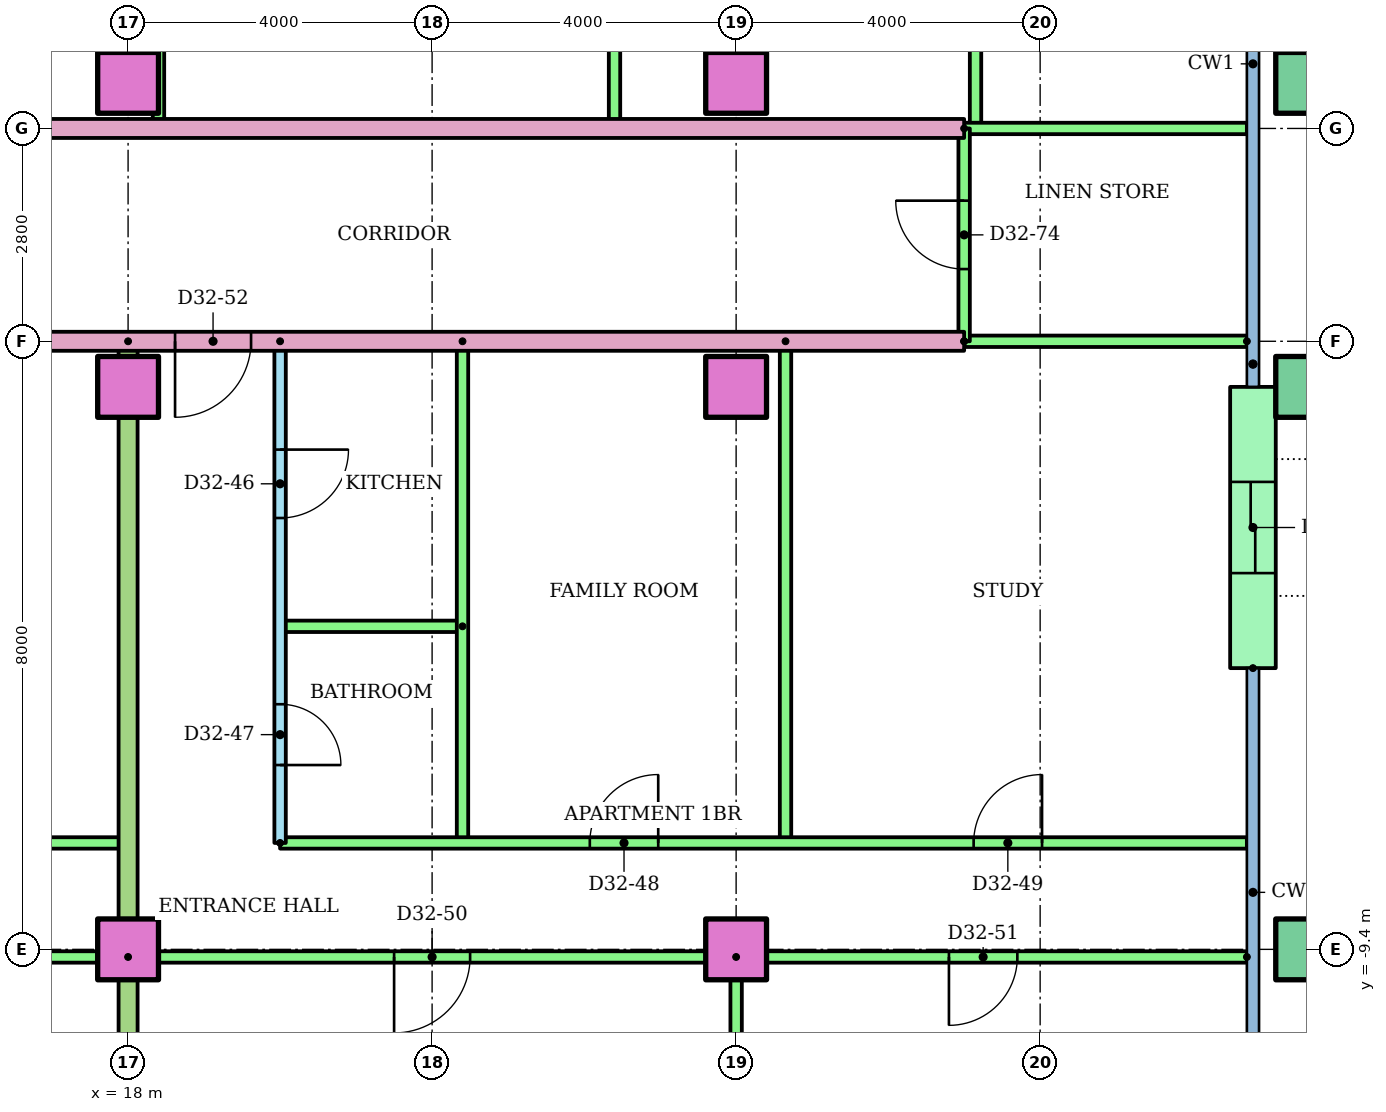
"""IFC4 building model, lengths in metres.
Left out: names, types, materials, properties, quantities, classifications, styles, units other than length and angle.
Written with IfcOpenShell. Run it as: python <this file> out.ifc"""

import sys

from ifc_helpers import new_model, si_unit, direction, frame, frame_2d, origin, origin_2d, place, context, subcontext, project, spatial, rectangle, hollow_rectangle, extrude, element, fill, save


model = new_model("IFC4")
c1 = context("Model", 3, precision=1e-05, world=origin(), true_north=direction((0.0, 1.0)))
c2 = subcontext(c1, "Body", "Model", "MODEL_VIEW")
j1 = project(units=[si_unit("LENGTHUNIT", "METRE"), si_unit("PLANEANGLEUNIT", "RADIAN")], contexts=[c1])
p1 = place(None, origin())
s1 = spatial("IfcSite", under=j1, at=p1, CompositionType="ELEMENT")
p2 = place(p1, origin())
s2 = spatial("IfcBuilding", under=s1, at=p2, CompositionType="ELEMENT")
p3 = place(p2, frame((0.0, 0.0, 126.2)))
s3 = spatial("IfcBuildingStorey", under=s2, at=p3, CompositionType="ELEMENT", Elevation=126.2)
for number, where in (
    (1, (18.0, -9.4, 0.0)),
    (2, (26.0, -9.4, 0.0)),
):
    element("IfcColumn", number, at=place(p3, frame(where)), inside=s3, PredefinedType="COLUMN", context=c2, shape_type="SweptSolid", body=[
        extrude(rectangle(XDim=0.8, YDim=0.8, at=origin_2d()), origin(), (0.0, 0.0, 1.0), 3.2),
    ])
p4 = place(p3, frame((33.5, -9.4, 0.0)))
e3 = element("IfcColumn", 3, at=p4, inside=s3, PredefinedType="COLUMN", context=c2, shape_type="SweptSolid", body=[
    extrude(hollow_rectangle(XDim=0.8, YDim=0.8, WallThickness=0.04, at=origin_2d()), origin(), (0.0, 0.0, 1.0), 3.2),
])
for number, where in (
    (4, (18.0, -2.0, 0.0)),
    (5, (26.0, -2.0, 0.0)),
):
    element("IfcColumn", number, at=place(p3, frame(where)), inside=s3, PredefinedType="COLUMN", context=c2, shape_type="SweptSolid", body=[
        extrude(rectangle(XDim=0.8, YDim=0.8, at=origin_2d()), origin(), (0.0, 0.0, 1.0), 3.2),
    ])
p5 = place(p3, frame((33.5, -2.0, 0.0)))
e6 = element("IfcColumn", 6, at=p5, inside=s3, PredefinedType="COLUMN", context=c2, shape_type="SweptSolid", body=[
    extrude(hollow_rectangle(XDim=0.8, YDim=0.8, WallThickness=0.04, at=origin_2d()), origin(), (0.0, 0.0, 1.0), 3.2),
])
for number, where in (
    (7, (18.0, 2.0, 0.0)),
    (8, (26.0, 2.0, 0.0)),
):
    element("IfcColumn", number, at=place(p3, frame(where)), inside=s3, PredefinedType="COLUMN", context=c2, shape_type="SweptSolid", body=[
        extrude(rectangle(XDim=0.8, YDim=0.8, at=origin_2d()), origin(), (0.0, 0.0, 1.0), 3.2),
    ])
p6 = place(p3, frame((33.5, 2.0, 0.0)))
e9 = element("IfcColumn", 9, at=p6, inside=s3, PredefinedType="COLUMN", context=c2, shape_type="SweptSolid", body=[
    extrude(hollow_rectangle(XDim=0.8, YDim=0.8, WallThickness=0.04, at=origin_2d()), origin(), (0.0, 0.0, 1.0), 3.2),
])
p7 = place(p3, frame((32.8, -5.7, 0.0), z_axis=(0.0, 0.0, 1.0), x_axis=(0.0, 1.0, 0.0)))
e10 = element("IfcWall", 10, at=p7, inside=s3, PredefinedType="STANDARD", context=c2, shape_type="SweptSolid", body=[
    extrude(rectangle(XDim=3.7, YDim=0.6, at=frame_2d((1.85, 0.0))), origin(), (0.0, 0.0, 1.0), 2.92),
])
p8 = place(p7, frame((1.25, 0.0, 0.0)))
e11 = element("IfcOpeningElement", 11, at=p8, cuts=e10, PredefinedType="OPENING", context=c2, shape_type="SweptSolid", body=[
    extrude(rectangle(XDim=1.2, YDim=2.1, at=frame_2d((0.6, 1.05))), frame((0.0, 0.31, 0.0), z_axis=(0.0, -1.0, 0.0), x_axis=(1.0, 0.0, 0.0)), (0.0, 0.0, 1.0), 0.62),
])
p9 = place(p3, frame((4.0, -8.0, 0.0)))
e12 = element("IfcWall", 12, at=p9, inside=s3, PredefinedType="PARTITIONING", context=c2, shape_type="SweptSolid", body=[
    extrude(rectangle(XDim=14.0, YDim=0.15, at=frame_2d((7.0, 0.0))), origin(), (0.0, 0.0, 1.0), 2.4),
])
p10 = place(p9, frame((4.325, 0.0, 0.0)))
e13 = element("IfcOpeningElement", 13, at=p10, cuts=e12, PredefinedType="OPENING", context=c2, shape_type="SweptSolid", body=[
    extrude(rectangle(XDim=0.9, YDim=2.1, at=frame_2d((0.45, 1.05))), frame((0.0, 0.085, 0.0), z_axis=(0.0, -1.0, 0.0), x_axis=(1.0, 0.0, 0.0)), (0.0, 0.0, 1.0), 0.17),
])
p11 = place(p9, frame((8.575, 0.0, 0.0)))
e14 = element("IfcOpeningElement", 14, at=p11, cuts=e12, PredefinedType="OPENING", context=c2, shape_type="SweptSolid", body=[
    extrude(rectangle(XDim=0.9, YDim=2.1, at=frame_2d((0.45, 1.05))), frame((0.0, 0.085, 0.0), z_axis=(0.0, -1.0, 0.0), x_axis=(1.0, 0.0, 0.0)), (0.0, 0.0, 1.0), 0.17),
])
p12 = place(p9, frame((12.0, 0.0, 0.0)))
e15 = element("IfcOpeningElement", 15, at=p12, cuts=e12, PredefinedType="OPENING", context=c2, shape_type="SweptSolid", body=[
    extrude(rectangle(XDim=0.9, YDim=2.1, at=frame_2d((0.45, 1.05))), frame((0.0, 0.085, 0.0), z_axis=(0.0, -1.0, 0.0), x_axis=(1.0, 0.0, 0.0)), (0.0, 0.0, 1.0), 0.17),
])
p13 = place(p3, frame((18.0, -9.5, 0.0), z_axis=(0.0, 0.0, 1.0), x_axis=(-1.0, 0.0, 0.0)))
e16 = element("IfcWall", 16, at=p13, inside=s3, PredefinedType="PARTITIONING", context=c2, shape_type="SweptSolid", body=[
    extrude(rectangle(XDim=16.0, YDim=0.15, at=frame_2d((8.0, 0.0))), origin(), (0.0, 0.0, 1.0), 2.4),
])
p14 = place(p13, frame((13.55, 0.0, 0.0)))
e17 = element("IfcOpeningElement", 17, at=p14, cuts=e16, PredefinedType="OPENING", context=c2, shape_type="SweptSolid", body=[
    extrude(rectangle(XDim=0.9, YDim=2.1, at=frame_2d((0.45, 1.05))), frame((0.0, 0.085, 0.0), z_axis=(0.0, -1.0, 0.0), x_axis=(1.0, 0.0, 0.0)), (0.0, 0.0, 1.0), 0.17),
])
p15 = place(p13, frame((9.55, 0.0, 0.0)))
e18 = element("IfcOpeningElement", 18, at=p15, cuts=e16, PredefinedType="OPENING", context=c2, shape_type="SweptSolid", body=[
    extrude(rectangle(XDim=0.9, YDim=2.1, at=frame_2d((0.45, 1.05))), frame((0.0, 0.085, 0.0), z_axis=(0.0, -1.0, 0.0), x_axis=(1.0, 0.0, 0.0)), (0.0, 0.0, 1.0), 0.17),
])
p16 = place(p13, frame((5.55, 0.0, 0.0)))
e19 = element("IfcOpeningElement", 19, at=p16, cuts=e16, PredefinedType="OPENING", context=c2, shape_type="SweptSolid", body=[
    extrude(rectangle(XDim=0.9, YDim=2.1, at=frame_2d((0.45, 1.05))), frame((0.0, 0.085, 0.0), z_axis=(0.0, -1.0, 0.0), x_axis=(1.0, 0.0, 0.0)), (0.0, 0.0, 1.0), 0.17),
])
p17 = place(p13, frame((1.5, 0.0, 0.0)))
e20 = element("IfcOpeningElement", 20, at=p17, cuts=e16, PredefinedType="OPENING", context=c2, shape_type="SweptSolid", body=[
    extrude(rectangle(XDim=1.0, YDim=2.1, at=frame_2d((0.5, 1.05))), frame((0.0, 0.085, 0.0), z_axis=(0.0, -1.0, 0.0), x_axis=(1.0, 0.0, 0.0)), (0.0, 0.0, 1.0), 0.17),
])
p18 = place(p3, frame((20.0, -1.4, 0.0), z_axis=(0.0, 0.0, 1.0), x_axis=(0.0, -1.0, 0.0)))
e21 = element("IfcWall", 21, at=p18, inside=s3, PredefinedType="PARTITIONING", context=c2, shape_type="SweptSolid", body=[
    extrude(rectangle(XDim=6.6, YDim=0.15, at=frame_2d((3.3, 0.0))), origin(), (0.0, 0.0, 1.0), 2.4),
])
p19 = place(p18, frame((1.425, 0.0, 0.0)))
e22 = element("IfcOpeningElement", 22, at=p19, cuts=e21, PredefinedType="OPENING", context=c2, shape_type="SweptSolid", body=[
    extrude(rectangle(XDim=0.9, YDim=2.1, at=frame_2d((0.45, 1.05))), frame((0.0, 0.085, 0.0), z_axis=(0.0, -1.0, 0.0), x_axis=(1.0, 0.0, 0.0)), (0.0, 0.0, 1.0), 0.17),
])
p20 = place(p18, frame((4.775, 0.0, 0.0)))
e23 = element("IfcOpeningElement", 23, at=p20, cuts=e21, PredefinedType="OPENING", context=c2, shape_type="SweptSolid", body=[
    extrude(rectangle(XDim=0.8, YDim=2.1, at=frame_2d((0.4, 1.05))), frame((0.0, 0.085, 0.0), z_axis=(0.0, -1.0, 0.0), x_axis=(1.0, 0.0, 0.0)), (0.0, 0.0, 1.0), 0.17),
])
p21 = place(p3, frame((22.4, -5.15, 0.0), z_axis=(0.0, 0.0, 1.0), x_axis=(-1.0, 0.0, 0.0)))
e24 = element("IfcWall", 24, at=p21, inside=s3, PredefinedType="PARTITIONING", context=c2, shape_type="SweptSolid", body=[
    extrude(rectangle(XDim=2.4, YDim=0.15, at=frame_2d((1.2, 0.0))), origin(), (0.0, 0.0, 1.0), 2.4),
])
for number, where, z_axis, x_axis in (
    (25, (22.4, -1.4, 0.0), (0.0, 0.0, 1.0), (0.0, -1.0, 0.0)),
    (26, (26.65, -1.4, 0.0), (0.0, 0.0, 1.0), (0.0, -1.0, 0.0)),
):
    element("IfcWall", number, at=place(p3, frame(where, z_axis=z_axis, x_axis=x_axis)), inside=s3, PredefinedType="PARTITIONING", context=c2, shape_type="SweptSolid", body=[
        extrude(rectangle(XDim=6.6, YDim=0.15, at=frame_2d((3.3, 0.0))), origin(), (0.0, 0.0, 1.0), 2.4),
    ])
p22 = place(p3, frame((20.0, -8.0, 0.0)))
e27 = element("IfcWall", 27, at=p22, inside=s3, PredefinedType="PARTITIONING", context=c2, shape_type="SweptSolid", body=[
    extrude(rectangle(XDim=12.72, YDim=0.15, at=frame_2d((6.36, 0.0))), origin(), (0.0, 0.0, 1.0), 2.4),
])
p23 = place(p22, frame((4.075, 0.0, 0.0)))
e28 = element("IfcOpeningElement", 28, at=p23, cuts=e27, PredefinedType="OPENING", context=c2, shape_type="SweptSolid", body=[
    extrude(rectangle(XDim=0.9, YDim=2.1, at=frame_2d((0.45, 1.05))), frame((0.0, 0.085, 0.0), z_axis=(0.0, -1.0, 0.0), x_axis=(1.0, 0.0, 0.0)), (0.0, 0.0, 1.0), 0.17),
])
p24 = place(p22, frame((9.125, 0.0, 0.0)))
e29 = element("IfcOpeningElement", 29, at=p24, cuts=e27, PredefinedType="OPENING", context=c2, shape_type="SweptSolid", body=[
    extrude(rectangle(XDim=0.9, YDim=2.1, at=frame_2d((0.45, 1.05))), frame((0.0, 0.085, 0.0), z_axis=(0.0, -1.0, 0.0), x_axis=(1.0, 0.0, 0.0)), (0.0, 0.0, 1.0), 0.17),
])
p25 = place(p3, frame((32.72, -9.5, 0.0), z_axis=(0.0, 0.0, 1.0), x_axis=(-1.0, 0.0, 0.0)))
e30 = element("IfcWall", 30, at=p25, inside=s3, PredefinedType="PARTITIONING", context=c2, shape_type="SweptSolid", body=[
    extrude(rectangle(XDim=14.72, YDim=0.15, at=frame_2d((7.36, 0.0))), origin(), (0.0, 0.0, 1.0), 2.4),
])
p26 = place(p25, frame((10.22, 0.0, 0.0)))
e31 = element("IfcOpeningElement", 31, at=p26, cuts=e30, PredefinedType="OPENING", context=c2, shape_type="SweptSolid", body=[
    extrude(rectangle(XDim=1.0, YDim=2.1, at=frame_2d((0.5, 1.05))), frame((0.0, 0.085, 0.0), z_axis=(0.0, -1.0, 0.0), x_axis=(1.0, 0.0, 0.0)), (0.0, 0.0, 1.0), 0.17),
])
p27 = place(p25, frame((3.02, 0.0, 0.0)))
e32 = element("IfcOpeningElement", 32, at=p27, cuts=e30, PredefinedType="OPENING", context=c2, shape_type="SweptSolid", body=[
    extrude(rectangle(XDim=0.9, YDim=2.1, at=frame_2d((0.45, 1.05))), frame((0.0, 0.085, 0.0), z_axis=(0.0, -1.0, 0.0), x_axis=(1.0, 0.0, 0.0)), (0.0, 0.0, 1.0), 0.17),
])
p28 = place(p3, frame((26.0, -9.5, 0.0), z_axis=(0.0, 0.0, 1.0), x_axis=(0.0, -1.0, 0.0)))
e33 = element("IfcWall", 33, at=p28, inside=s3, PredefinedType="PARTITIONING", context=c2, shape_type="SweptSolid", body=[
    extrude(rectangle(XDim=6.81, YDim=0.15, at=frame_2d((3.405, 0.0))), origin(), (0.0, 0.0, 1.0), 2.4),
])
p29 = place(p3, frame((18.0, -1.4, 0.0), z_axis=(0.0, 0.0, 1.0), x_axis=(0.0, -1.0, 0.0)))
e34 = element("IfcWall", 34, at=p29, inside=s3, PredefinedType="PARTITIONING", context=c2, shape_type="SweptSolid", body=[
    extrude(rectangle(XDim=14.91, YDim=0.25, at=frame_2d((7.455, 0.0))), origin(), (0.0, 0.0, 1.0), 2.4),
])
p30 = place(p3, frame((29.0, -1.4, 0.0), z_axis=(0.0, 0.0, 1.0), x_axis=(-1.0, 0.0, 0.0)))
e35 = element("IfcWall", 35, at=p30, inside=s3, PredefinedType="PARTITIONING", context=c2, shape_type="SweptSolid", body=[
    extrude(rectangle(XDim=15.0, YDim=0.25, at=frame_2d((7.5, 0.0))), origin(), (0.0, 0.0, 1.0), 2.4),
])
p31 = place(p30, frame((9.382, 0.0, 0.0)))
e36 = element("IfcOpeningElement", 36, at=p31, cuts=e35, PredefinedType="OPENING", context=c2, shape_type="SweptSolid", body=[
    extrude(rectangle(XDim=1.0, YDim=2.1, at=frame_2d((0.5, 1.05))), frame((0.0, 0.135, 0.0), z_axis=(0.0, -1.0, 0.0), x_axis=(1.0, 0.0, 0.0)), (0.0, 0.0, 1.0), 0.27),
])
p32 = place(p3, frame((32.72, -1.4, 0.0), z_axis=(0.0, 0.0, 1.0), x_axis=(-1.0, 0.0, 0.0)))
e37 = element("IfcWall", 37, at=p32, inside=s3, PredefinedType="PARTITIONING", context=c2, shape_type="SweptSolid", body=[
    extrude(rectangle(XDim=3.72, YDim=0.15, at=frame_2d((1.86, 0.0))), origin(), (0.0, 0.0, 1.0), 2.4),
])
for number, where, z_axis, x_axis in (
    (38, (18.4, 10.4, 0.0), (0.0, 0.0, 1.0), (0.0, -1.0, 0.0)),
    (39, (24.4, 10.4, 0.0), (0.0, 0.0, 1.0), (0.0, -1.0, 0.0)),
    (40, (29.15, 10.4, 0.0), (0.0, 0.0, 1.0), (0.0, -1.0, 0.0)),
):
    element("IfcWall", number, at=place(p3, frame(where, z_axis=z_axis, x_axis=x_axis)), inside=s3, PredefinedType="PARTITIONING", context=c2, shape_type="SweptSolid", body=[
        extrude(rectangle(XDim=9.0, YDim=0.15, at=frame_2d((4.5, 0.0))), origin(), (0.0, 0.0, 1.0), 2.4),
    ])
p33 = place(p3, frame((14.0, 1.4, 0.0)))
e41 = element("IfcWall", 41, at=p33, inside=s3, PredefinedType="PARTITIONING", context=c2, shape_type="SweptSolid", body=[
    extrude(rectangle(XDim=15.0, YDim=0.25, at=frame_2d((7.5, 0.0))), origin(), (0.0, 0.0, 1.0), 2.4),
])
p34 = place(p33, frame((0.5, 0.0, 0.0)))
e42 = element("IfcOpeningElement", 42, at=p34, cuts=e41, PredefinedType="OPENING", context=c2, shape_type="SweptSolid", body=[
    extrude(rectangle(XDim=1.0, YDim=2.1, at=frame_2d((0.5, 1.05))), frame((0.0, 0.135, 0.0), z_axis=(0.0, -1.0, 0.0), x_axis=(1.0, 0.0, 0.0)), (0.0, 0.0, 1.0), 0.27),
])
p35 = place(p3, frame((29.0, 1.4, 0.0)))
e43 = element("IfcWall", 43, at=p35, inside=s3, PredefinedType="PARTITIONING", context=c2, shape_type="SweptSolid", body=[
    extrude(rectangle(XDim=3.72, YDim=0.15, at=frame_2d((1.86, 0.0))), origin(), (0.0, 0.0, 1.0), 2.4),
])
p36 = place(p3, frame((29.0, -1.4, 0.0), z_axis=(0.0, 0.0, 1.0), x_axis=(0.0, 1.0, 0.0)))
e44 = element("IfcWall", 44, at=p36, inside=s3, PredefinedType="PARTITIONING", context=c2, shape_type="SweptSolid", body=[
    extrude(rectangle(XDim=2.8, YDim=0.15, at=frame_2d((1.4, 0.0))), origin(), (0.0, 0.0, 1.0), 2.4),
])
p37 = place(p36, frame((0.95, 0.0, 0.0)))
e45 = element("IfcOpeningElement", 45, at=p37, cuts=e44, PredefinedType="OPENING", context=c2, shape_type="SweptSolid", body=[
    extrude(rectangle(XDim=0.9, YDim=2.1, at=frame_2d((0.45, 1.05))), frame((0.0, 0.085, 0.0), z_axis=(0.0, -1.0, 0.0), x_axis=(1.0, 0.0, 0.0)), (0.0, 0.0, 1.0), 0.17),
])
p38 = place(p19, origin())
e46 = element("IfcDoor", 46, at=p38, inside=s3, OperationType="SINGLE_SWING_LEFT", PredefinedType="DOOR", context=c2, shape_type="SweptSolid", body=[
    extrude(rectangle(XDim=0.9, YDim=2.1, at=frame_2d((0.45, 1.05))), frame((0.0, 0.025, 0.0), z_axis=(0.0, -1.0, 0.0), x_axis=(1.0, 0.0, 0.0)), (0.0, 0.0, 1.0), 0.05),
])
fill(e22, e46)
p39 = place(p20, origin())
e47 = element("IfcDoor", 47, at=p39, inside=s3, OperationType="SINGLE_SWING_RIGHT", PredefinedType="DOOR", context=c2, shape_type="SweptSolid", body=[
    extrude(rectangle(XDim=0.8, YDim=2.1, at=frame_2d((0.4, 1.05))), frame((0.0, 0.025, 0.0), z_axis=(0.0, -1.0, 0.0), x_axis=(1.0, 0.0, 0.0)), (0.0, 0.0, 1.0), 0.05),
])
fill(e23, e47)
p40 = place(p23, origin())
e48 = element("IfcDoor", 48, at=p40, inside=s3, OperationType="SINGLE_SWING_RIGHT", PredefinedType="DOOR", context=c2, shape_type="SweptSolid", body=[
    extrude(rectangle(XDim=0.9, YDim=2.1, at=frame_2d((0.45, 1.05))), frame((0.0, 0.025, 0.0), z_axis=(0.0, -1.0, 0.0), x_axis=(1.0, 0.0, 0.0)), (0.0, 0.0, 1.0), 0.05),
])
fill(e28, e48)
p41 = place(p24, origin())
e49 = element("IfcDoor", 49, at=p41, inside=s3, OperationType="SINGLE_SWING_RIGHT", PredefinedType="DOOR", context=c2, shape_type="SweptSolid", body=[
    extrude(rectangle(XDim=0.9, YDim=2.1, at=frame_2d((0.45, 1.05))), frame((0.0, 0.025, 0.0), z_axis=(0.0, -1.0, 0.0), x_axis=(1.0, 0.0, 0.0)), (0.0, 0.0, 1.0), 0.05),
])
fill(e29, e49)
p42 = place(p26, origin())
e50 = element("IfcDoor", 50, at=p42, inside=s3, OperationType="SINGLE_SWING_RIGHT", PredefinedType="DOOR", context=c2, shape_type="SweptSolid", body=[
    extrude(rectangle(XDim=1.0, YDim=2.1, at=frame_2d((0.5, 1.05))), frame((0.0, 0.025, 0.0), z_axis=(0.0, -1.0, 0.0), x_axis=(1.0, 0.0, 0.0)), (0.0, 0.0, 1.0), 0.05),
])
fill(e31, e50)
p43 = place(p27, origin())
e51 = element("IfcDoor", 51, at=p43, inside=s3, OperationType="SINGLE_SWING_RIGHT", PredefinedType="DOOR", context=c2, shape_type="SweptSolid", body=[
    extrude(rectangle(XDim=0.9, YDim=2.1, at=frame_2d((0.45, 1.05))), frame((0.0, 0.025, 0.0), z_axis=(0.0, -1.0, 0.0), x_axis=(1.0, 0.0, 0.0)), (0.0, 0.0, 1.0), 0.05),
])
fill(e32, e51)
p44 = place(p31, origin())
e52 = element("IfcDoor", 52, at=p44, inside=s3, OperationType="SINGLE_SWING_RIGHT", PredefinedType="DOOR", context=c2, shape_type="SweptSolid", body=[
    extrude(rectangle(XDim=1.0, YDim=2.1, at=frame_2d((0.5, 1.05))), frame((0.0, 0.025, 0.0), z_axis=(0.0, -1.0, 0.0), x_axis=(1.0, 0.0, 0.0)), (0.0, 0.0, 1.0), 0.05),
])
fill(e36, e52)
p45 = place(p37, origin())
e53 = element("IfcDoor", 53, at=p45, inside=s3, OperationType="SINGLE_SWING_RIGHT", PredefinedType="DOOR", context=c2, shape_type="SweptSolid", body=[
    extrude(rectangle(XDim=0.9, YDim=2.1, at=frame_2d((0.45, 1.05))), frame((0.0, 0.025, 0.0), z_axis=(0.0, -1.0, 0.0), x_axis=(1.0, 0.0, 0.0)), (0.0, 0.0, 1.0), 0.05),
])
fill(e45, e53)
p46 = place(p8, origin())
e54 = element("IfcDoor", 54, at=p46, inside=s3, OperationType="SLIDING_TO_LEFT", PredefinedType="DOOR", context=c2, shape_type="SweptSolid", body=[
    extrude(rectangle(XDim=1.2, YDim=2.1, at=frame_2d((0.6, 1.05))), frame((0.0, 0.025, 0.0), z_axis=(0.0, -1.0, 0.0), x_axis=(1.0, 0.0, 0.0)), (0.0, 0.0, 1.0), 0.05),
])
fill(e11, e54)
save(model, sys.argv[1])
